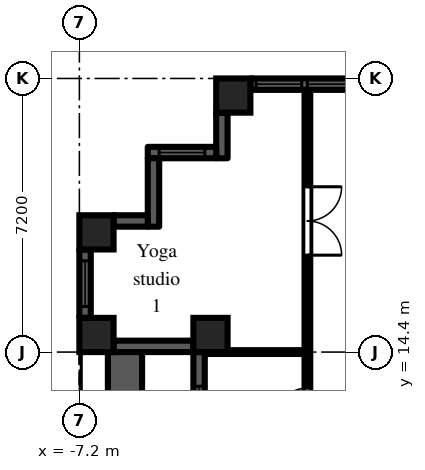
"""IFC4 building model, lengths in metres.
Left out: names, types, materials, properties, quantities, classifications, styles, units other than length and angle.
Written with IfcOpenShell. Run it as: python <this file> out.ifc"""

import sys

from ifc_helpers import new_model, si_unit, direction, frame, frame_2d, origin, origin_2d, place, context, subcontext, project, spatial, rectangle, extrude, element, fill, save


model = new_model("IFC4")
c1 = context("Model", 3, precision=1e-05, world=origin(), true_north=direction((0.0, 1.0)))
c2 = subcontext(c1, "Body", "Model", "MODEL_VIEW")
j1 = project(units=[si_unit("LENGTHUNIT", "METRE"), si_unit("PLANEANGLEUNIT", "RADIAN")], contexts=[c1])
p1 = place(None, origin())
s1 = spatial("IfcSite", under=j1, at=p1, CompositionType="ELEMENT")
p2 = place(p1, origin())
s2 = spatial("IfcBuilding", under=s1, at=p2, CompositionType="ELEMENT")
p3 = place(p2, frame((0.0, 0.0, 93.9)))
s3 = spatial("IfcBuildingStorey", under=s2, at=p3, CompositionType="ELEMENT", Elevation=93.9)
for number, where, z_axis, x_axis in (
    (1, (-6.75, 14.85, 0.0), (0.0, 0.0, 1.0), (1.0, 0.0, 0.0)),
    (2, (-6.75, 17.55, 0.0), (0.0, 0.0, 1.0), (1.0, 0.0, 0.0)),
    (3, (-3.75, 14.85, 0.0), (0.0, 0.0, 1.0), (1.0, 0.0, 0.0)),
    (4, (-3.15, 21.15, 0.0), (0.0, 0.0, 1.0), (1.0, 0.0, 0.0)),
):
    element("IfcColumn", number, at=place(p3, frame(where, z_axis=z_axis, x_axis=x_axis)), inside=s3, PredefinedType="COLUMN", context=c2, shape_type="SweptSolid", body=[
        extrude(rectangle(XDim=0.9, YDim=0.9, at=origin_2d()), origin(), (0.0, 0.0, 1.0), 3.0),
    ])
p4 = place(p3, frame((2.7, 21.45, 0.0), z_axis=(0.0, 0.0, 1.0), x_axis=(-1.0, 0.0, 0.0)))
e5 = element("IfcWall", 5, at=p4, inside=s3, PredefinedType="SOLIDWALL", context=c2, shape_type="SweptSolid", body=[
    extrude(rectangle(XDim=5.4, YDim=0.3, at=frame_2d((2.7, 0.0))), origin(), (0.0, 0.0, 1.0), 2.1),
])
p5 = place(p4, frame((1.5, 0.0, 0.2)))
e6 = element("IfcOpeningElement", 6, at=p5, cuts=e5, PredefinedType="OPENING", context=c2, shape_type="SweptSolid", body=[
    extrude(rectangle(XDim=2.4, YDim=1.85, at=frame_2d((1.2, 0.925))), frame((0.0, 0.16, 0.0), z_axis=(0.0, -1.0, 0.0), x_axis=(1.0, 0.0, 0.0)), (0.0, 0.0, 1.0), 0.32),
])
p6 = place(p4, frame((0.15, 0.0, 0.2)))
e7 = element("IfcOpeningElement", 7, at=p6, cuts=e5, PredefinedType="OPENING", context=c2, shape_type="SweptSolid", body=[
    extrude(rectangle(XDim=1.2, YDim=1.85, at=frame_2d((0.6, 0.925))), frame((0.0, 0.16, 0.0), z_axis=(0.0, -1.0, 0.0), x_axis=(1.0, 0.0, 0.0)), (0.0, 0.0, 1.0), 0.32),
])
p7 = place(p4, frame((4.05, 0.0, 0.2)))
e8 = element("IfcOpeningElement", 8, at=p7, cuts=e5, PredefinedType="OPENING", context=c2, shape_type="SweptSolid", body=[
    extrude(rectangle(XDim=1.2, YDim=1.85, at=frame_2d((0.6, 0.925))), frame((0.0, 0.16, 0.0), z_axis=(0.0, -1.0, 0.0), x_axis=(1.0, 0.0, 0.0)), (0.0, 0.0, 1.0), 0.32),
])
p8 = place(p3, frame((-3.45, 20.7, 0.0), z_axis=(0.0, 0.0, 1.0), x_axis=(0.0, -1.0, 0.0)))
e9 = element("IfcWall", 9, at=p8, inside=s3, PredefinedType="SOLIDWALL", context=c2, shape_type="SweptSolid", body=[
    extrude(rectangle(XDim=1.2, YDim=0.3, at=frame_2d((0.6, 0.0))), origin(), (0.0, 0.0, 1.0), 2.575),
])
p9 = place(p3, frame((-3.6, 19.65, 0.0), z_axis=(0.0, 0.0, 1.0), x_axis=(-1.0, 0.0, 0.0)))
e10 = element("IfcWall", 10, at=p9, inside=s3, PredefinedType="SOLIDWALL", context=c2, shape_type="SweptSolid", body=[
    extrude(rectangle(XDim=1.8, YDim=0.3, at=frame_2d((0.9, 0.0))), origin(), (0.0, 0.0, 1.0), 2.575),
])
p10 = place(p9, frame((0.3, 0.0, 0.2)))
e11 = element("IfcOpeningElement", 11, at=p10, cuts=e10, PredefinedType="OPENING", context=c2, shape_type="SweptSolid", body=[
    extrude(rectangle(XDim=1.2, YDim=1.85, at=frame_2d((0.6, 0.925))), frame((0.0, 0.16, 0.0), z_axis=(0.0, -1.0, 0.0), x_axis=(1.0, 0.0, 0.0)), (0.0, 0.0, 1.0), 0.32),
])
p11 = place(p3, frame((-5.25, 19.5, 0.0), z_axis=(0.0, 0.0, 1.0), x_axis=(0.0, -1.0, 0.0)))
e12 = element("IfcWall", 12, at=p11, inside=s3, PredefinedType="SOLIDWALL", context=c2, shape_type="SweptSolid", body=[
    extrude(rectangle(XDim=1.8, YDim=0.3, at=frame_2d((0.9, 0.0))), origin(), (0.0, 0.0, 1.0), 2.575),
])
p12 = place(p3, frame((-5.4, 17.85, 0.0), z_axis=(0.0, 0.0, 1.0), x_axis=(-1.0, 0.0, 0.0)))
e13 = element("IfcWall", 13, at=p12, inside=s3, PredefinedType="SOLIDWALL", context=c2, shape_type="SweptSolid", body=[
    extrude(rectangle(XDim=0.9, YDim=0.3, at=frame_2d((0.45, 0.0))), origin(), (0.0, 0.0, 1.0), 2.575),
])
p13 = place(p3, frame((-7.05, 17.1, 0.0), z_axis=(0.0, 0.0, 1.0), x_axis=(0.0, -1.0, 0.0)))
e14 = element("IfcWall", 14, at=p13, inside=s3, PredefinedType="SOLIDWALL", context=c2, shape_type="SweptSolid", body=[
    extrude(rectangle(XDim=1.8, YDim=0.3, at=frame_2d((0.9, 0.0))), origin(), (0.0, 0.0, 1.0), 2.1),
])
p14 = place(p13, frame((0.3, 0.0, 0.2)))
e15 = element("IfcOpeningElement", 15, at=p14, cuts=e14, PredefinedType="OPENING", context=c2, shape_type="SweptSolid", body=[
    extrude(rectangle(XDim=1.2, YDim=1.85, at=frame_2d((0.6, 0.925))), frame((0.0, 0.16, 0.0), z_axis=(0.0, -1.0, 0.0), x_axis=(1.0, 0.0, 0.0)), (0.0, 0.0, 1.0), 0.32),
])
p15 = place(p3, frame((-6.3, 14.55, 0.0), z_axis=(0.0, 0.0, 1.0), x_axis=(1.0, 0.0, 0.0)))
e16 = element("IfcWall", 16, at=p15, inside=s3, PredefinedType="SOLIDWALL", context=c2, shape_type="SweptSolid", body=[
    extrude(rectangle(XDim=2.1, YDim=0.3, at=frame_2d((1.05, 0.0))), origin(), (0.0, 0.0, 1.0), 2.1),
])
p16 = place(p3, frame((-4.05, 14.4, 0.0), z_axis=(0.0, 0.0, 1.0), x_axis=(0.0, -1.0, 0.0)))
e17 = element("IfcWall", 17, at=p16, inside=s3, PredefinedType="SOLIDWALL", context=c2, shape_type="SweptSolid", body=[
    extrude(rectangle(XDim=7.2, YDim=0.3, at=frame_2d((3.6, 0.0))), origin(), (0.0, 0.0, 1.0), 2.1),
])
p17 = place(p16, frame((3.0, 0.0, 0.0)))
e18 = element("IfcOpeningElement", 18, at=p17, cuts=e17, PredefinedType="OPENING", context=c2, shape_type="SweptSolid", body=[
    extrude(rectangle(XDim=1.2, YDim=2.05, at=frame_2d((0.6, 1.025))), frame((0.0, 0.16, 0.0), z_axis=(0.0, -1.0, 0.0), x_axis=(1.0, 0.0, 0.0)), (0.0, 0.0, 1.0), 0.32),
])
p18 = place(p16, frame((0.9, 0.0, 0.2)))
e19 = element("IfcOpeningElement", 19, at=p18, cuts=e17, PredefinedType="OPENING", context=c2, shape_type="SweptSolid", body=[
    extrude(rectangle(XDim=1.8, YDim=1.85, at=frame_2d((0.9, 0.925))), frame((0.0, 0.16, 0.0), z_axis=(0.0, -1.0, 0.0), x_axis=(1.0, 0.0, 0.0)), (0.0, 0.0, 1.0), 0.32),
])
p19 = place(p16, frame((4.5, 0.0, 0.2)))
e20 = element("IfcOpeningElement", 20, at=p19, cuts=e17, PredefinedType="OPENING", context=c2, shape_type="SweptSolid", body=[
    extrude(rectangle(XDim=1.8, YDim=1.85, at=frame_2d((0.9, 0.925))), frame((0.0, 0.16, 0.0), z_axis=(0.0, -1.0, 0.0), x_axis=(1.0, 0.0, 0.0)), (0.0, 0.0, 1.0), 0.32),
])
p20 = place(p3, frame((-6.0, 7.2, 0.0), z_axis=(0.0, 0.0, 1.0), x_axis=(0.0, 1.0, 0.0)))
e21 = element("IfcWall", 21, at=p20, inside=s3, PredefinedType="PARAPET", context=c2, shape_type="SweptSolid", body=[
    extrude(rectangle(XDim=7.2, YDim=0.9, at=frame_2d((3.6, 0.0))), origin(), (0.0, 0.0, 1.0), 0.8),
])
p21 = place(p3, frame((-3.9, 14.4, 0.0), z_axis=(0.0, 0.0, 1.0), x_axis=(1.0, 0.0, 0.0)))
e22 = element("IfcWall", 22, at=p21, inside=s3, PredefinedType="PARTITIONING", context=c2, shape_type="SweptSolid", body=[
    extrude(rectangle(XDim=2.625, YDim=0.1, at=frame_2d((1.312, 0.0))), origin(), (0.0, 0.0, 1.0), 2.575),
])
p22 = place(p3, frame((-1.2, 1.275, 0.0), z_axis=(0.0, 0.0, 1.0), x_axis=(0.0, 1.0, 0.0)))
e23 = element("IfcWall", 23, at=p22, inside=s3, PredefinedType="PARTITIONING", context=c2, shape_type="SweptSolid", body=[
    extrude(rectangle(XDim=20.025, YDim=0.15, at=frame_2d((10.013, 0.0))), origin(), (0.0, 0.0, 1.0), 2.575),
])
p23 = place(p22, frame((2.475, 0.0, 0.0)))
e24 = element("IfcOpeningElement", 24, at=p23, cuts=e23, PredefinedType="OPENING", context=c2, shape_type="SweptSolid", body=[
    extrude(rectangle(XDim=0.9, YDim=2.1, at=frame_2d((0.45, 1.05))), frame((0.0, 0.085, 0.0), z_axis=(0.0, -1.0, 0.0), x_axis=(1.0, 0.0, 0.0)), (0.0, 0.0, 1.0), 0.17),
])
p24 = place(p22, frame((11.275, 0.0, 0.0)))
e25 = element("IfcOpeningElement", 25, at=p24, cuts=e23, PredefinedType="OPENING", context=c2, shape_type="SweptSolid", body=[
    extrude(rectangle(XDim=0.9, YDim=2.1, at=frame_2d((0.45, 1.05))), frame((0.0, 0.085, 0.0), z_axis=(0.0, -1.0, 0.0), x_axis=(1.0, 0.0, 0.0)), (0.0, 0.0, 1.0), 0.17),
])
p25 = place(p22, frame((7.675, 0.0, 0.0)))
e26 = element("IfcOpeningElement", 26, at=p25, cuts=e23, PredefinedType="OPENING", context=c2, shape_type="SweptSolid", body=[
    extrude(rectangle(XDim=0.9, YDim=2.1, at=frame_2d((0.45, 1.05))), frame((0.0, 0.085, 0.0), z_axis=(0.0, -1.0, 0.0), x_axis=(1.0, 0.0, 0.0)), (0.0, 0.0, 1.0), 0.17),
])
p26 = place(p22, frame((15.675, 0.0, 0.0)))
e27 = element("IfcOpeningElement", 27, at=p26, cuts=e23, PredefinedType="OPENING", context=c2, shape_type="SweptSolid", body=[
    extrude(rectangle(XDim=1.8, YDim=2.1, at=frame_2d((0.9, 1.05))), frame((0.0, 0.085, 0.0), z_axis=(0.0, -1.0, 0.0), x_axis=(1.0, 0.0, 0.0)), (0.0, 0.0, 1.0), 0.17),
])
p27 = place(p5, origin())
e28 = element("IfcWindow", 28, at=p27, inside=s3, PartitioningType="SINGLE_PANEL", PredefinedType="WINDOW", context=c2, shape_type="SweptSolid", body=[
    extrude(rectangle(XDim=2.4, YDim=1.85, at=frame_2d((1.2, 0.925))), frame((0.0, 0.03, 0.0), z_axis=(0.0, -1.0, 0.0), x_axis=(1.0, 0.0, 0.0)), (0.0, 0.0, 1.0), 0.06),
])
fill(e6, e28)
p28 = place(p7, origin())
e29 = element("IfcWindow", 29, at=p28, inside=s3, PartitioningType="SINGLE_PANEL", PredefinedType="WINDOW", context=c2, shape_type="SweptSolid", body=[
    extrude(rectangle(XDim=1.2, YDim=1.85, at=frame_2d((0.6, 0.925))), frame((0.0, 0.03, 0.0), z_axis=(0.0, -1.0, 0.0), x_axis=(1.0, 0.0, 0.0)), (0.0, 0.0, 1.0), 0.06),
])
fill(e8, e29)
p29 = place(p10, origin())
e30 = element("IfcWindow", 30, at=p29, inside=s3, PartitioningType="SINGLE_PANEL", PredefinedType="WINDOW", context=c2, shape_type="SweptSolid", body=[
    extrude(rectangle(XDim=1.2, YDim=1.85, at=frame_2d((0.6, 0.925))), frame((0.0, 0.03, 0.0), z_axis=(0.0, -1.0, 0.0), x_axis=(1.0, 0.0, 0.0)), (0.0, 0.0, 1.0), 0.06),
])
fill(e11, e30)
p30 = place(p14, origin())
e31 = element("IfcWindow", 31, at=p30, inside=s3, PartitioningType="SINGLE_PANEL", PredefinedType="WINDOW", context=c2, shape_type="SweptSolid", body=[
    extrude(rectangle(XDim=1.2, YDim=1.85, at=frame_2d((0.6, 0.925))), frame((0.0, 0.03, 0.0), z_axis=(0.0, -1.0, 0.0), x_axis=(1.0, 0.0, 0.0)), (0.0, 0.0, 1.0), 0.06),
])
fill(e15, e31)
p31 = place(p18, origin())
e32 = element("IfcWindow", 32, at=p31, inside=s3, PartitioningType="SINGLE_PANEL", PredefinedType="WINDOW", context=c2, shape_type="SweptSolid", body=[
    extrude(rectangle(XDim=1.8, YDim=1.85, at=frame_2d((0.9, 0.925))), frame((0.0, 0.03, 0.0), z_axis=(0.0, -1.0, 0.0), x_axis=(1.0, 0.0, 0.0)), (0.0, 0.0, 1.0), 0.06),
])
fill(e19, e32)
p32 = place(p24, origin())
e33 = element("IfcDoor", 33, at=p32, inside=s3, OperationType="SINGLE_SWING_LEFT", PredefinedType="DOOR", context=c2, shape_type="SweptSolid", body=[
    extrude(rectangle(XDim=0.9, YDim=2.1, at=frame_2d((0.45, 1.05))), frame((0.0, 0.025, 0.0), z_axis=(0.0, -1.0, 0.0), x_axis=(1.0, 0.0, 0.0)), (0.0, 0.0, 1.0), 0.05),
])
fill(e25, e33)
p33 = place(p26, frame((1.8, 0.0, 0.0), z_axis=(0.0, 0.0, 1.0), x_axis=(-1.0, 0.0, 0.0)))
e34 = element("IfcDoor", 34, at=p33, inside=s3, OperationType="DOUBLE_DOOR_DOUBLE_SWING", PredefinedType="DOOR", context=c2, shape_type="SweptSolid", body=[
    extrude(rectangle(XDim=1.8, YDim=2.1, at=frame_2d((0.9, 1.05))), frame((0.0, 0.025, 0.0), z_axis=(0.0, -1.0, 0.0), x_axis=(1.0, 0.0, 0.0)), (0.0, 0.0, 1.0), 0.05),
])
fill(e27, e34)
save(model, sys.argv[1])
